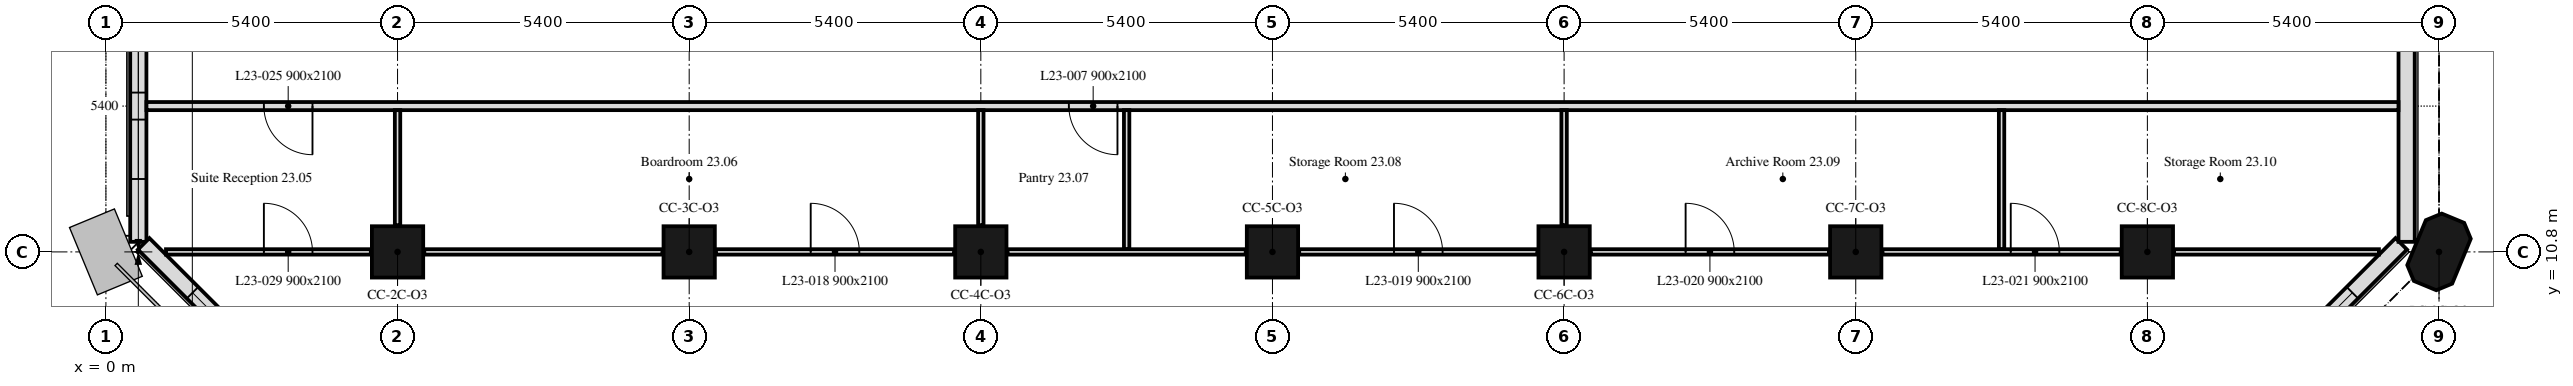
"""IFC4 building model, lengths in metres.
Left out: names, types, materials, properties, quantities, classifications, styles, units other than length and angle.
Written with IfcOpenShell. Run it as: python <this file> out.ifc"""

import sys

from ifc_helpers import new_model, si_unit, direction, frame, frame_2d, origin, origin_2d, place, context, subcontext, project, spatial, polyline, rectangle, outline, extrude, element, fill, save


model = new_model("IFC4")
c1 = context("Model", 3, precision=1e-05, world=origin(), true_north=direction((0.0, 1.0)))
c2 = subcontext(c1, "Body", "Model", "MODEL_VIEW")
j1 = project(units=[si_unit("LENGTHUNIT", "METRE"), si_unit("PLANEANGLEUNIT", "RADIAN")], contexts=[c1])
p1 = place(None, origin())
s1 = spatial("IfcSite", under=j1, at=p1, CompositionType="ELEMENT")
p2 = place(p1, origin())
s2 = spatial("IfcBuilding", under=s1, at=p2, CompositionType="ELEMENT")
p3 = place(p2, frame((0.0, 0.0, 99.2)))
s3 = spatial("IfcBuildingStorey", under=s2, at=p3, CompositionType="ELEMENT", Elevation=99.2)
for number, where, z_axis, x_axis in (
    (1, (5.4, 10.8, 0.0), (0.0, 0.0, 1.0), (1.0, 0.0, 0.0)),
    (2, (10.8, 10.8, 0.0), (0.0, 0.0, 1.0), (1.0, 0.0, 0.0)),
    (3, (16.2, 10.8, 0.0), (0.0, 0.0, 1.0), (1.0, 0.0, 0.0)),
    (4, (21.6, 10.8, 0.0), (0.0, 0.0, 1.0), (1.0, 0.0, 0.0)),
    (5, (27.0, 10.8, 0.0), (0.0, 0.0, 1.0), (1.0, 0.0, 0.0)),
    (6, (32.4, 10.8, 0.0), (0.0, 0.0, 1.0), (1.0, 0.0, 0.0)),
    (7, (37.8, 10.8, 0.0), (0.0, 0.0, 1.0), (1.0, 0.0, 0.0)),
):
    element("IfcColumn", number, at=place(p3, frame(where, z_axis=z_axis, x_axis=x_axis)), inside=s3, PredefinedType="COLUMN", context=c2, shape_type="SweptSolid", body=[
        extrude(rectangle(XDim=0.95, YDim=0.95, at=origin_2d()), origin(), (0.0, 0.0, 1.0), 3.5),
    ])
p4 = place(p3, frame((43.2, 10.8, 0.0), z_axis=(0.0, 0.0, 1.0), x_axis=(0.382683432365, 0.923879532511, 0.0)))
e8 = element("IfcColumn", 8, at=p4, inside=s3, PredefinedType="COLUMN", context=c2, shape_type="SweptSolid", body=[
    extrude(outline(polyline([(-0.45, -0.45), (0.45, -0.45), (0.675, -0.225), (0.675, 0.225), (0.45, 0.45), (-0.45, 0.45), (-0.675, 0.225), (-0.675, -0.225), (-0.45, -0.45)])), origin(), (0.0, 0.0, 1.0), 3.5),
])
p5 = place(p3, frame((37.65, 6.099, 0.0), z_axis=(0.0, 0.0, 1.0), x_axis=(0.707106781187, 0.707106781187, 0.0)))
e9 = element("IfcWall", 9, at=p5, inside=s3, PredefinedType="SOLIDWALL", context=c2, shape_type="SweptSolid", body=[
    extrude(rectangle(XDim=6.86, YDim=0.3, at=frame_2d((3.43, 0.0))), origin(), (0.0, 0.0, 1.0), 3.5),
])
p6 = place(p5, frame((1.28, 0.0, 0.9)))
e10 = element("IfcOpeningElement", 10, at=p6, cuts=e9, PredefinedType="OPENING", context=c2, shape_type="SweptSolid", body=[
    extrude(rectangle(XDim=1.1, YDim=1.7, at=frame_2d((0.55, 0.85))), frame((0.0, 0.16, 0.0), z_axis=(0.0, -1.0, 0.0), x_axis=(1.0, 0.0, 0.0)), (0.0, 0.0, 1.0), 0.32),
])
p7 = place(p5, frame((4.48, 0.0, 0.9)))
e11 = element("IfcOpeningElement", 11, at=p7, cuts=e9, PredefinedType="OPENING", context=c2, shape_type="SweptSolid", body=[
    extrude(rectangle(XDim=1.1, YDim=1.7, at=frame_2d((0.55, 0.85))), frame((0.0, 0.16, 0.0), z_axis=(0.0, -1.0, 0.0), x_axis=(1.0, 0.0, 0.0)), (0.0, 0.0, 1.0), 0.32),
])
p8 = place(p3, frame((42.6, 10.986, 0.0), z_axis=(0.0, 0.0, 1.0), x_axis=(0.0, 1.0, 0.0)))
e12 = element("IfcWall", 12, at=p8, inside=s3, PredefinedType="SOLIDWALL", context=c2, shape_type="SweptSolid", body=[
    extrude(rectangle(XDim=5.214, YDim=0.3, at=frame_2d((2.607, 0.0))), origin(), (0.0, 0.0, 1.0), 3.5),
])
p9 = place(p3, frame((0.6, 43.014, 0.0), z_axis=(0.0, 0.0, 1.0), x_axis=(0.0, -1.0, 0.0)))
e13 = element("IfcWall", 13, at=p9, inside=s3, PredefinedType="SOLIDWALL", context=c2, shape_type="SweptSolid", body=[
    extrude(rectangle(XDim=32.027, YDim=0.3, at=frame_2d((16.014, 0.0))), origin(), (0.0, 0.0, 1.0), 3.5),
])
p10 = place(p9, frame((28.164, 0.0, 0.9)))
e14 = element("IfcOpeningElement", 14, at=p10, cuts=e13, PredefinedType="OPENING", context=c2, shape_type="SweptSolid", body=[
    extrude(rectangle(XDim=1.1, YDim=1.7, at=frame_2d((0.55, 0.85))), frame((0.0, 0.16, 0.0), z_axis=(0.0, -1.0, 0.0), x_axis=(1.0, 0.0, 0.0)), (0.0, 0.0, 1.0), 0.32),
])
p11 = place(p9, frame((29.764, 0.0, 0.9)))
e15 = element("IfcOpeningElement", 15, at=p11, cuts=e13, PredefinedType="OPENING", context=c2, shape_type="SweptSolid", body=[
    extrude(rectangle(XDim=1.1, YDim=1.7, at=frame_2d((0.55, 0.85))), frame((0.0, 0.16, 0.0), z_axis=(0.0, -1.0, 0.0), x_axis=(1.0, 0.0, 0.0)), (0.0, 0.0, 1.0), 0.32),
])
p12 = place(p3, frame((0.699, 10.949, 0.0), z_axis=(0.0, 0.0, 1.0), x_axis=(0.707106781187, -0.707106781187, 0.0)))
e16 = element("IfcWall", 16, at=p12, inside=s3, PredefinedType="SOLIDWALL", context=c2, shape_type="SweptSolid", body=[
    extrude(rectangle(XDim=6.86, YDim=0.3, at=frame_2d((3.43, 0.0))), origin(), (0.0, 0.0, 1.0), 3.5),
])
p13 = place(p12, frame((1.28, 0.0, 0.9)))
e17 = element("IfcOpeningElement", 17, at=p13, cuts=e16, PredefinedType="OPENING", context=c2, shape_type="SweptSolid", body=[
    extrude(rectangle(XDim=1.1, YDim=1.7, at=frame_2d((0.55, 0.85))), frame((0.0, 0.16, 0.0), z_axis=(0.0, -1.0, 0.0), x_axis=(1.0, 0.0, 0.0)), (0.0, 0.0, 1.0), 0.32),
])
p14 = place(p12, frame((4.48, 0.0, 0.9)))
e18 = element("IfcOpeningElement", 18, at=p14, cuts=e16, PredefinedType="OPENING", context=c2, shape_type="SweptSolid", body=[
    extrude(rectangle(XDim=1.1, YDim=1.7, at=frame_2d((0.55, 0.85))), frame((0.0, 0.16, 0.0), z_axis=(0.0, -1.0, 0.0), x_axis=(1.0, 0.0, 0.0)), (0.0, 0.0, 1.0), 0.32),
])
p15 = place(p3, frame((42.449, 13.5, 0.0), z_axis=(0.0, 0.0, 1.0), x_axis=(-1.0, 0.0, 0.0)))
e19 = element("IfcWall", 19, at=p15, inside=s3, PredefinedType="PARTITIONING", context=c2, shape_type="SweptSolid", body=[
    extrude(rectangle(XDim=41.698, YDim=0.15, at=frame_2d((20.849, 0.0))), origin(), (0.0, 0.0, 1.0), 3.5),
])
p16 = place(p15, frame((23.719, 0.0, 0.0)))
e20 = element("IfcOpeningElement", 20, at=p16, cuts=e19, PredefinedType="OPENING", context=c2, shape_type="SweptSolid", body=[
    extrude(rectangle(XDim=0.9, YDim=2.1, at=frame_2d((0.45, 1.05))), frame((0.0, 0.075, 0.0), z_axis=(0.0, -1.0, 0.0), x_axis=(1.0, 0.0, 0.0)), (0.0, 0.0, 1.0), 0.15),
])
p17 = place(p15, frame((38.624, 0.0, 0.0)))
e21 = element("IfcOpeningElement", 21, at=p17, cuts=e19, PredefinedType="OPENING", context=c2, shape_type="SweptSolid", body=[
    extrude(rectangle(XDim=0.9, YDim=2.1, at=frame_2d((0.45, 1.05))), frame((0.0, 0.075, 0.0), z_axis=(0.0, -1.0, 0.0), x_axis=(1.0, 0.0, 0.0)), (0.0, 0.0, 1.0), 0.15),
])
p18 = place(p3, frame((1.112, 10.8, 0.0), z_axis=(0.0, 0.0, 1.0), x_axis=(1.0, 0.0, 0.0)))
e22 = element("IfcWall", 22, at=p18, inside=s3, PredefinedType="PARTITIONING", context=c2, shape_type="SweptSolid", body=[
    extrude(rectangle(XDim=3.793, YDim=0.1, at=frame_2d((1.896, 0.0))), origin(), (0.0, 0.0, 1.0), 3.5),
])
p19 = place(p18, frame((1.813, 0.0, 0.0)))
e23 = element("IfcOpeningElement", 23, at=p19, cuts=e22, PredefinedType="OPENING", context=c2, shape_type="SweptSolid", body=[
    extrude(rectangle(XDim=0.9, YDim=2.1, at=frame_2d((0.45, 1.05))), frame((0.0, 0.05, 0.0), z_axis=(0.0, -1.0, 0.0), x_axis=(1.0, 0.0, 0.0)), (0.0, 0.0, 1.0), 0.1),
])
p20 = place(p3, frame((5.4, 11.295, 0.0), z_axis=(0.0, 0.0, 1.0), x_axis=(0.0, 1.0, 0.0)))
e24 = element("IfcWall", 24, at=p20, inside=s3, PredefinedType="PARTITIONING", context=c2, shape_type="SweptSolid", body=[
    extrude(rectangle(XDim=2.13, YDim=0.1, at=frame_2d((1.065, 0.0))), origin(), (0.0, 0.0, 1.0), 3.5),
])
p21 = place(p3, frame((5.895, 10.8, 0.0), z_axis=(0.0, 0.0, 1.0), x_axis=(1.0, 0.0, 0.0)))
e25 = element("IfcWall", 25, at=p21, inside=s3, PredefinedType="PARTITIONING", context=c2, shape_type="SweptSolid", body=[
    extrude(rectangle(XDim=4.41, YDim=0.1, at=frame_2d((2.205, 0.0))), origin(), (0.0, 0.0, 1.0), 3.5),
])
p22 = place(p3, frame((11.295, 10.8, 0.0), z_axis=(0.0, 0.0, 1.0), x_axis=(1.0, 0.0, 0.0)))
e26 = element("IfcWall", 26, at=p22, inside=s3, PredefinedType="PARTITIONING", context=c2, shape_type="SweptSolid", body=[
    extrude(rectangle(XDim=4.41, YDim=0.1, at=frame_2d((2.205, 0.0))), origin(), (0.0, 0.0, 1.0), 3.5),
])
p23 = place(p22, frame((1.755, 0.0, 0.0)))
e27 = element("IfcOpeningElement", 27, at=p23, cuts=e26, PredefinedType="OPENING", context=c2, shape_type="SweptSolid", body=[
    extrude(rectangle(XDim=0.9, YDim=2.1, at=frame_2d((0.45, 1.05))), frame((0.0, 0.05, 0.0), z_axis=(0.0, -1.0, 0.0), x_axis=(1.0, 0.0, 0.0)), (0.0, 0.0, 1.0), 0.1),
])
p24 = place(p3, frame((16.2, 11.295, 0.0), z_axis=(0.0, 0.0, 1.0), x_axis=(0.0, 1.0, 0.0)))
e28 = element("IfcWall", 28, at=p24, inside=s3, PredefinedType="PARTITIONING", context=c2, shape_type="SweptSolid", body=[
    extrude(rectangle(XDim=2.13, YDim=0.1, at=frame_2d((1.065, 0.0))), origin(), (0.0, 0.0, 1.0), 3.5),
])
p25 = place(p3, frame((18.9, 10.85, 0.0), z_axis=(0.0, 0.0, 1.0), x_axis=(0.0, 1.0, 0.0)))
e29 = element("IfcWall", 29, at=p25, inside=s3, PredefinedType="PARTITIONING", context=c2, shape_type="SweptSolid", body=[
    extrude(rectangle(XDim=2.575, YDim=0.1, at=frame_2d((1.288, 0.0))), origin(), (0.0, 0.0, 1.0), 3.5),
])
p26 = place(p3, frame((16.695, 10.8, 0.0), z_axis=(0.0, 0.0, 1.0), x_axis=(1.0, 0.0, 0.0)))
e30 = element("IfcWall", 30, at=p26, inside=s3, PredefinedType="PARTITIONING", context=c2, shape_type="SweptSolid", body=[
    extrude(rectangle(XDim=4.41, YDim=0.1, at=frame_2d((2.205, 0.0))), origin(), (0.0, 0.0, 1.0), 3.5),
])
p27 = place(p3, frame((22.095, 10.8, 0.0), z_axis=(0.0, 0.0, 1.0), x_axis=(1.0, 0.0, 0.0)))
e31 = element("IfcWall", 31, at=p27, inside=s3, PredefinedType="PARTITIONING", context=c2, shape_type="SweptSolid", body=[
    extrude(rectangle(XDim=4.41, YDim=0.1, at=frame_2d((2.205, 0.0))), origin(), (0.0, 0.0, 1.0), 3.5),
])
p28 = place(p27, frame((1.755, 0.0, 0.0)))
e32 = element("IfcOpeningElement", 32, at=p28, cuts=e31, PredefinedType="OPENING", context=c2, shape_type="SweptSolid", body=[
    extrude(rectangle(XDim=0.9, YDim=2.1, at=frame_2d((0.45, 1.05))), frame((0.0, 0.05, 0.0), z_axis=(0.0, -1.0, 0.0), x_axis=(1.0, 0.0, 0.0)), (0.0, 0.0, 1.0), 0.1),
])
p29 = place(p3, frame((27.0, 11.295, 0.0), z_axis=(0.0, 0.0, 1.0), x_axis=(0.0, 1.0, 0.0)))
e33 = element("IfcWall", 33, at=p29, inside=s3, PredefinedType="PARTITIONING", context=c2, shape_type="SweptSolid", body=[
    extrude(rectangle(XDim=2.13, YDim=0.1, at=frame_2d((1.065, 0.0))), origin(), (0.0, 0.0, 1.0), 3.5),
])
p30 = place(p3, frame((27.495, 10.8, 0.0), z_axis=(0.0, 0.0, 1.0), x_axis=(1.0, 0.0, 0.0)))
e34 = element("IfcWall", 34, at=p30, inside=s3, PredefinedType="PARTITIONING", context=c2, shape_type="SweptSolid", body=[
    extrude(rectangle(XDim=4.41, YDim=0.1, at=frame_2d((2.205, 0.0))), origin(), (0.0, 0.0, 1.0), 3.5),
])
p31 = place(p30, frame((1.755, 0.0, 0.0)))
e35 = element("IfcOpeningElement", 35, at=p31, cuts=e34, PredefinedType="OPENING", context=c2, shape_type="SweptSolid", body=[
    extrude(rectangle(XDim=0.9, YDim=2.1, at=frame_2d((0.45, 1.05))), frame((0.0, 0.05, 0.0), z_axis=(0.0, -1.0, 0.0), x_axis=(1.0, 0.0, 0.0)), (0.0, 0.0, 1.0), 0.1),
])
p32 = place(p3, frame((35.1, 10.85, 0.0), z_axis=(0.0, 0.0, 1.0), x_axis=(0.0, 1.0, 0.0)))
e36 = element("IfcWall", 36, at=p32, inside=s3, PredefinedType="PARTITIONING", context=c2, shape_type="SweptSolid", body=[
    extrude(rectangle(XDim=2.575, YDim=0.1, at=frame_2d((1.288, 0.0))), origin(), (0.0, 0.0, 1.0), 3.5),
])
p33 = place(p3, frame((32.895, 10.8, 0.0), z_axis=(0.0, 0.0, 1.0), x_axis=(1.0, 0.0, 0.0)))
e37 = element("IfcWall", 37, at=p33, inside=s3, PredefinedType="PARTITIONING", context=c2, shape_type="SweptSolid", body=[
    extrude(rectangle(XDim=4.41, YDim=0.1, at=frame_2d((2.205, 0.0))), origin(), (0.0, 0.0, 1.0), 3.5),
])
p34 = place(p33, frame((2.375, 0.0, 0.0)))
e38 = element("IfcOpeningElement", 38, at=p34, cuts=e37, PredefinedType="OPENING", context=c2, shape_type="SweptSolid", body=[
    extrude(rectangle(XDim=0.9, YDim=2.1, at=frame_2d((0.45, 1.05))), frame((0.0, 0.05, 0.0), z_axis=(0.0, -1.0, 0.0), x_axis=(1.0, 0.0, 0.0)), (0.0, 0.0, 1.0), 0.1),
])
p35 = place(p3, frame((38.295, 10.8, 0.0), z_axis=(0.0, 0.0, 1.0), x_axis=(1.0, 0.0, 0.0)))
e39 = element("IfcWall", 39, at=p35, inside=s3, PredefinedType="PARTITIONING", context=c2, shape_type="SweptSolid", body=[
    extrude(rectangle(XDim=3.793, YDim=0.1, at=frame_2d((1.896, 0.0))), origin(), (0.0, 0.0, 1.0), 3.5),
])
p36 = place(p7, origin())
e40 = element("IfcWindow", 40, at=p36, inside=s3, PartitioningType="SINGLE_PANEL", PredefinedType="WINDOW", context=c2, shape_type="SweptSolid", body=[
    extrude(rectangle(XDim=1.1, YDim=1.7, at=frame_2d((0.55, 0.85))), frame((0.0, 0.03, 0.0), z_axis=(0.0, -1.0, 0.0), x_axis=(1.0, 0.0, 0.0)), (0.0, 0.0, 1.0), 0.06),
])
fill(e11, e40)
p37 = place(p10, origin())
e41 = element("IfcWindow", 41, at=p37, inside=s3, PartitioningType="SINGLE_PANEL", PredefinedType="WINDOW", context=c2, shape_type="SweptSolid", body=[
    extrude(rectangle(XDim=1.1, YDim=1.7, at=frame_2d((0.55, 0.85))), frame((0.0, 0.03, 0.0), z_axis=(0.0, -1.0, 0.0), x_axis=(1.0, 0.0, 0.0)), (0.0, 0.0, 1.0), 0.06),
])
fill(e14, e41)
p38 = place(p11, origin())
e42 = element("IfcWindow", 42, at=p38, inside=s3, PartitioningType="SINGLE_PANEL", PredefinedType="WINDOW", context=c2, shape_type="SweptSolid", body=[
    extrude(rectangle(XDim=1.1, YDim=1.7, at=frame_2d((0.55, 0.85))), frame((0.0, 0.03, 0.0), z_axis=(0.0, -1.0, 0.0), x_axis=(1.0, 0.0, 0.0)), (0.0, 0.0, 1.0), 0.06),
])
fill(e15, e42)
p39 = place(p13, origin())
e43 = element("IfcWindow", 43, at=p39, inside=s3, PartitioningType="SINGLE_PANEL", PredefinedType="WINDOW", context=c2, shape_type="SweptSolid", body=[
    extrude(rectangle(XDim=1.1, YDim=1.7, at=frame_2d((0.55, 0.85))), frame((0.0, 0.03, 0.0), z_axis=(0.0, -1.0, 0.0), x_axis=(1.0, 0.0, 0.0)), (0.0, 0.0, 1.0), 0.06),
])
fill(e17, e43)
p40 = place(p16, origin())
e44 = element("IfcDoor", 44, at=p40, inside=s3, OperationType="SINGLE_SWING_RIGHT", PredefinedType="DOOR", context=c2, shape_type="SweptSolid", body=[
    extrude(rectangle(XDim=0.9, YDim=2.1, at=frame_2d((0.45, 1.05))), frame((0.0, 0.025, 0.0), z_axis=(0.0, -1.0, 0.0), x_axis=(1.0, 0.0, 0.0)), (0.0, 0.0, 1.0), 0.05),
])
fill(e20, e44)
p41 = place(p23, origin())
e45 = element("IfcDoor", 45, at=p41, inside=s3, OperationType="SINGLE_SWING_LEFT", PredefinedType="DOOR", context=c2, shape_type="SweptSolid", body=[
    extrude(rectangle(XDim=0.9, YDim=2.1, at=frame_2d((0.45, 1.05))), frame((0.0, 0.025, 0.0), z_axis=(0.0, -1.0, 0.0), x_axis=(1.0, 0.0, 0.0)), (0.0, 0.0, 1.0), 0.05),
])
fill(e27, e45)
p42 = place(p28, origin())
e46 = element("IfcDoor", 46, at=p42, inside=s3, OperationType="SINGLE_SWING_RIGHT", PredefinedType="DOOR", context=c2, shape_type="SweptSolid", body=[
    extrude(rectangle(XDim=0.9, YDim=2.1, at=frame_2d((0.45, 1.05))), frame((0.0, 0.025, 0.0), z_axis=(0.0, -1.0, 0.0), x_axis=(1.0, 0.0, 0.0)), (0.0, 0.0, 1.0), 0.05),
])
fill(e32, e46)
p43 = place(p31, origin())
e47 = element("IfcDoor", 47, at=p43, inside=s3, OperationType="SINGLE_SWING_LEFT", PredefinedType="DOOR", context=c2, shape_type="SweptSolid", body=[
    extrude(rectangle(XDim=0.9, YDim=2.1, at=frame_2d((0.45, 1.05))), frame((0.0, 0.025, 0.0), z_axis=(0.0, -1.0, 0.0), x_axis=(1.0, 0.0, 0.0)), (0.0, 0.0, 1.0), 0.05),
])
fill(e35, e47)
p44 = place(p34, origin())
e48 = element("IfcDoor", 48, at=p44, inside=s3, OperationType="SINGLE_SWING_RIGHT", PredefinedType="DOOR", context=c2, shape_type="SweptSolid", body=[
    extrude(rectangle(XDim=0.9, YDim=2.1, at=frame_2d((0.45, 1.05))), frame((0.0, 0.025, 0.0), z_axis=(0.0, -1.0, 0.0), x_axis=(1.0, 0.0, 0.0)), (0.0, 0.0, 1.0), 0.05),
])
fill(e38, e48)
p45 = place(p17, origin())
e49 = element("IfcDoor", 49, at=p45, inside=s3, OperationType="SINGLE_SWING_RIGHT", PredefinedType="DOOR", context=c2, shape_type="SweptSolid", body=[
    extrude(rectangle(XDim=0.9, YDim=2.1, at=frame_2d((0.45, 1.05))), frame((0.0, 0.025, 0.0), z_axis=(0.0, -1.0, 0.0), x_axis=(1.0, 0.0, 0.0)), (0.0, 0.0, 1.0), 0.05),
])
fill(e21, e49)
p46 = place(p19, origin())
e50 = element("IfcDoor", 50, at=p46, inside=s3, OperationType="SINGLE_SWING_RIGHT", PredefinedType="DOOR", context=c2, shape_type="SweptSolid", body=[
    extrude(rectangle(XDim=0.9, YDim=2.1, at=frame_2d((0.45, 1.05))), frame((0.0, 0.025, 0.0), z_axis=(0.0, -1.0, 0.0), x_axis=(1.0, 0.0, 0.0)), (0.0, 0.0, 1.0), 0.05),
])
fill(e23, e50)
save(model, sys.argv[1])
